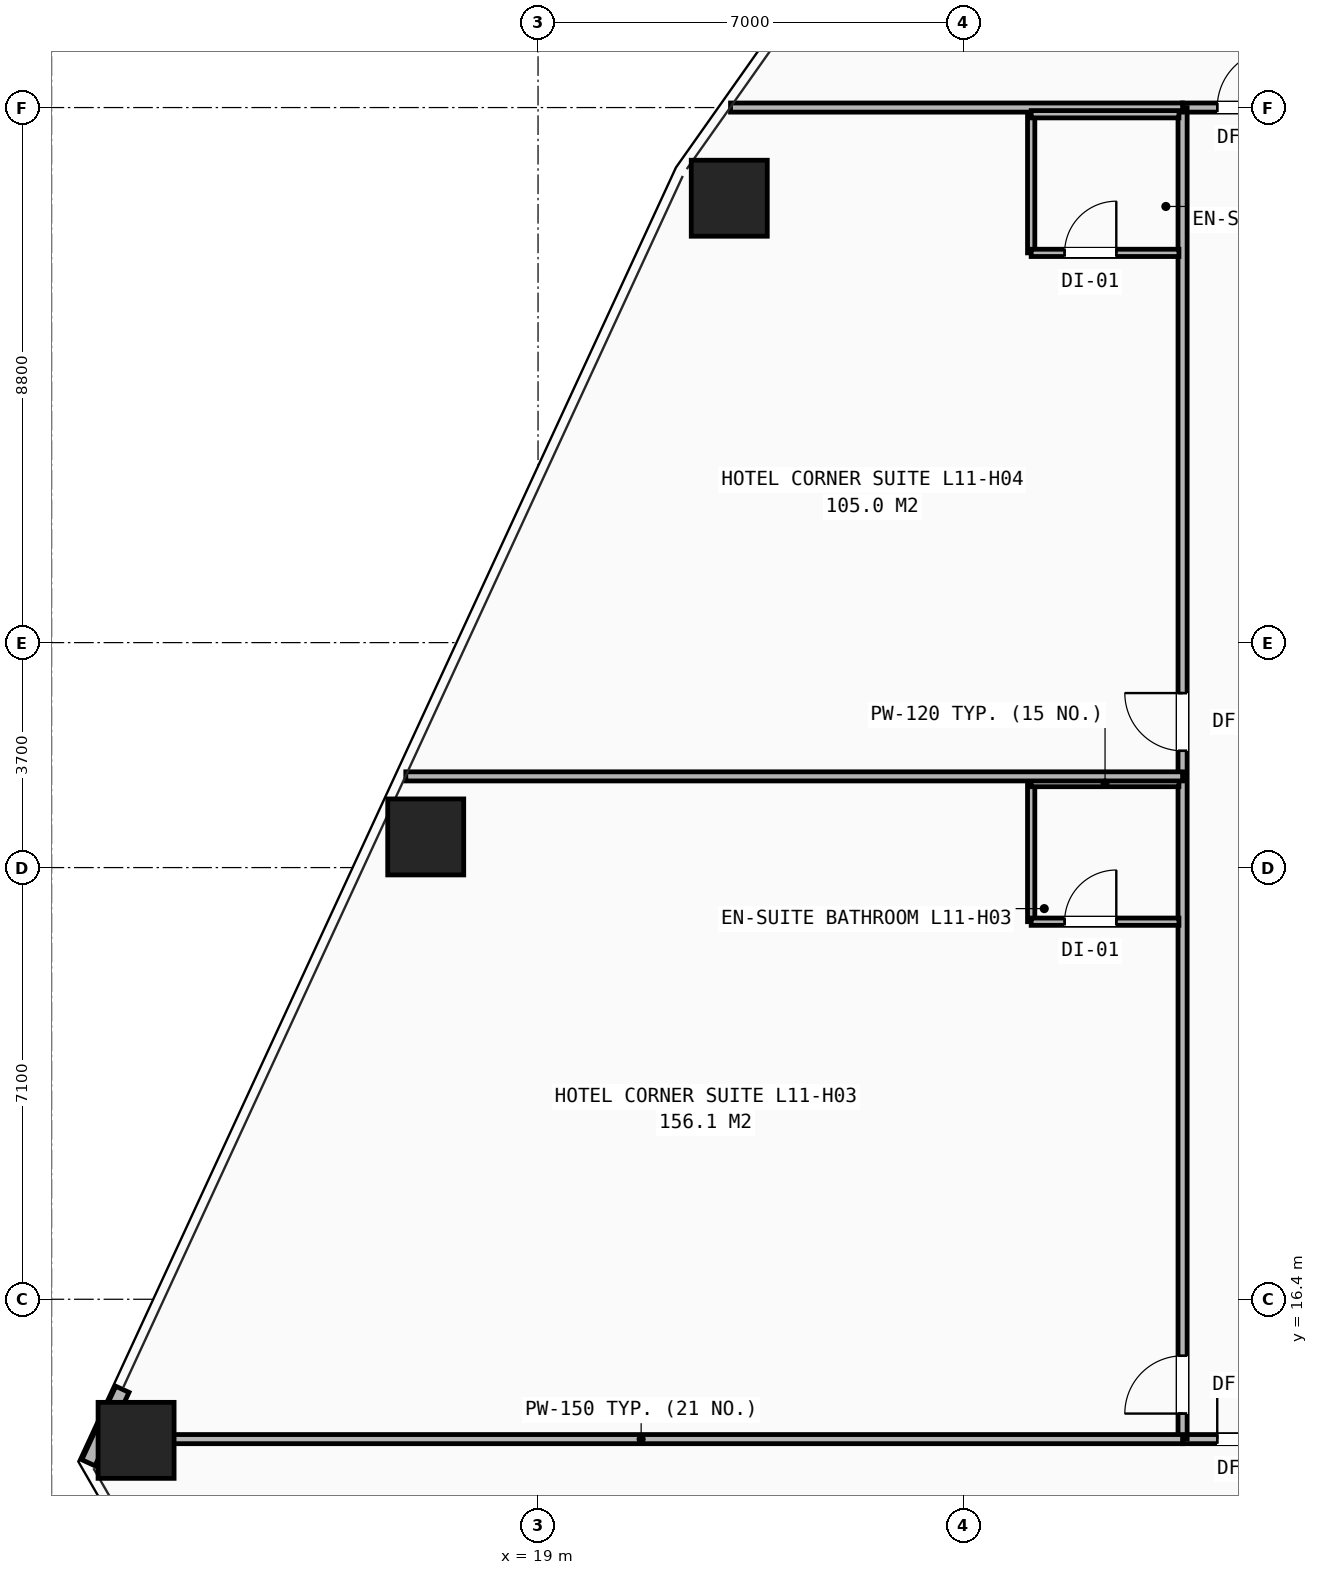
"""IFC4 building model, lengths in metres.
Left out: names, types, materials, properties, quantities, classifications, styles, units other than length and angle.
Written with IfcOpenShell. Run it as: python <this file> out.ifc"""

import sys

from ifc_helpers import new_model, si_unit, direction, frame, frame_2d, origin, origin_2d, place, context, subcontext, project, spatial, rectangle, hollow_rectangle, extrude, element, fill, save


model = new_model("IFC4")
c1 = context("Model", 3, precision=1e-05, world=origin(), true_north=direction((0.0, 1.0)))
c2 = subcontext(c1, "Body", "Model", "MODEL_VIEW")
j1 = project(units=[si_unit("LENGTHUNIT", "METRE"), si_unit("PLANEANGLEUNIT", "RADIAN")], contexts=[c1])
p1 = place(None, origin())
s1 = spatial("IfcSite", under=j1, at=p1, CompositionType="ELEMENT")
p2 = place(p1, origin())
s2 = spatial("IfcBuilding", under=s1, at=p2, CompositionType="ELEMENT")
p3 = place(p2, frame((0.0, 0.0, 43.2)))
s3 = spatial("IfcBuildingStorey", under=s2, at=p3, CompositionType="ELEMENT", Elevation=43.2)
for number, where, z_axis, x_axis in (
    (1, (22.145, 34.509, 0.0), (0.0, 0.0, 1.0), (1.0, 0.0, 0.0)),
    (2, (17.153, 24.004, 0.0), (0.0, 0.0, 1.0), (1.0, 0.0, 0.0)),
    (3, (12.389, 14.08, 0.0), (0.0, 0.0, 1.0), (1.0, 0.0, 0.0)),
):
    element("IfcColumn", number, at=place(p3, frame(where, z_axis=z_axis, x_axis=x_axis)), inside=s3, PredefinedType="COLUMN", context=c2, shape_type="SweptSolid", body=[
        extrude(hollow_rectangle(XDim=1.25, YDim=1.25, WallThickness=0.08, at=origin_2d()), origin(), (0.0, 0.0, 1.0), 3.2),
    ])
p4 = place(p3, frame((12.164, 14.919, 0.0), z_axis=(0.0, 0.0, 1.0), x_axis=(-0.419348851808, -0.907825170662, 0.0)))
e4 = element("IfcWall", 4, at=p4, inside=s3, PredefinedType="SHEAR", context=c2, shape_type="SweptSolid", body=[
    extrude(rectangle(XDim=1.332, YDim=0.24, at=frame_2d((0.666, 0.0))), origin(), (0.0, 0.0, 1.0), 2.263),
])
p5 = place(p3, frame((29.6, 14.1, 0.0), z_axis=(0.0, 0.0, 1.0), x_axis=(1.0, 0.0, 0.0)))
e5 = element("IfcWall", 5, at=p5, inside=s3, PredefinedType="PARTITIONING", context=c2, shape_type="SweptSolid", body=[
    extrude(rectangle(XDim=20.8, YDim=0.15, at=frame_2d((10.4, 0.0))), origin(), (0.0, 0.0, 1.0), 2.191),
])
p6 = place(p5, frame((0.57, 0.0, 0.0)))
e6 = element("IfcOpeningElement", 6, at=p6, cuts=e5, PredefinedType="OPENING", context=c2, shape_type="SweptSolid", body=[
    extrude(rectangle(XDim=0.95, YDim=2.1, at=frame_2d((0.475, 1.05))), frame((0.0, 0.085, 0.0), z_axis=(0.0, -1.0, 0.0), x_axis=(1.0, 0.0, 0.0)), (0.0, 0.0, 1.0), 0.17),
])
p7 = place(p5, frame((10.32, 0.0, 0.0)))
e7 = element("IfcOpeningElement", 7, at=p7, cuts=e5, PredefinedType="OPENING", context=c2, shape_type="SweptSolid", body=[
    extrude(rectangle(XDim=0.95, YDim=2.1, at=frame_2d((0.475, 1.05))), frame((0.0, 0.085, 0.0), z_axis=(0.0, -1.0, 0.0), x_axis=(1.0, 0.0, 0.0)), (0.0, 0.0, 1.0), 0.17),
])
p8 = place(p3, frame((29.6, 36.0, 0.0), z_axis=(0.0, 0.0, 1.0), x_axis=(1.0, 0.0, 0.0)))
e8 = element("IfcWall", 8, at=p8, inside=s3, PredefinedType="PARTITIONING", context=c2, shape_type="SweptSolid", body=[
    extrude(rectangle(XDim=9.65, YDim=0.15, at=frame_2d((4.825, 0.0))), origin(), (0.0, 0.0, 1.0), 2.98),
])
p9 = place(p8, frame((0.57, 0.0, 0.0)))
e9 = element("IfcOpeningElement", 9, at=p9, cuts=e8, PredefinedType="OPENING", context=c2, shape_type="SweptSolid", body=[
    extrude(rectangle(XDim=0.95, YDim=2.1, at=frame_2d((0.475, 1.05))), frame((0.0, 0.085, 0.0), z_axis=(0.0, -1.0, 0.0), x_axis=(1.0, 0.0, 0.0)), (0.0, 0.0, 1.0), 0.17),
])
p10 = place(p3, frame((29.6, 14.1, 0.0), z_axis=(0.0, 0.0, 1.0), x_axis=(0.0, 1.0, 0.0)))
e10 = element("IfcWall", 10, at=p10, inside=s3, PredefinedType="PARTITIONING", context=c2, shape_type="SweptSolid", body=[
    extrude(rectangle(XDim=21.9, YDim=0.15, at=frame_2d((10.95, 0.0))), origin(), (0.0, 0.0, 1.0), 2.191),
])
p11 = place(p10, frame((0.42, 0.0, 0.0)))
e11 = element("IfcOpeningElement", 11, at=p11, cuts=e10, PredefinedType="OPENING", context=c2, shape_type="SweptSolid", body=[
    extrude(rectangle(XDim=0.95, YDim=2.1, at=frame_2d((0.475, 1.05))), frame((0.0, 0.085, 0.0), z_axis=(0.0, -1.0, 0.0), x_axis=(1.0, 0.0, 0.0)), (0.0, 0.0, 1.0), 0.17),
])
p12 = place(p10, frame((11.32, 0.0, 0.0)))
e12 = element("IfcOpeningElement", 12, at=p12, cuts=e10, PredefinedType="OPENING", context=c2, shape_type="SweptSolid", body=[
    extrude(rectangle(XDim=0.95, YDim=2.1, at=frame_2d((0.475, 1.05))), frame((0.0, 0.085, 0.0), z_axis=(0.0, -1.0, 0.0), x_axis=(1.0, 0.0, 0.0)), (0.0, 0.0, 1.0), 0.17),
])
p13 = place(p3, frame((11.791, 14.1, 0.0), z_axis=(0.0, 0.0, 1.0), x_axis=(1.0, 0.0, 0.0)))
e13 = element("IfcWall", 13, at=p13, inside=s3, PredefinedType="PARTITIONING", context=c2, shape_type="SweptSolid", body=[
    extrude(rectangle(XDim=17.809, YDim=0.15, at=frame_2d((8.904, 0.0))), origin(), (0.0, 0.0, 1.0), 2.191),
])
p14 = place(p3, frame((22.166, 36.0, 0.0), z_axis=(0.0, 0.0, 1.0), x_axis=(1.0, 0.0, 0.0)))
e14 = element("IfcWall", 14, at=p14, inside=s3, PredefinedType="PARTITIONING", context=c2, shape_type="SweptSolid", body=[
    extrude(rectangle(XDim=7.434, YDim=0.15, at=frame_2d((3.717, 0.0))), origin(), (0.0, 0.0, 1.0), 2.268),
])
p15 = place(p3, frame((27.11, 22.61, 0.0), z_axis=(0.0, 0.0, 1.0), x_axis=(0.0, 1.0, 0.0)))
e15 = element("IfcWall", 15, at=p15, inside=s3, PredefinedType="PARTITIONING", context=c2, shape_type="SweptSolid", body=[
    extrude(rectangle(XDim=2.28, YDim=0.12, at=frame_2d((1.14, 0.0))), origin(), (0.0, 0.0, 1.0), 2.98),
])
p16 = place(p3, frame((27.11, 22.61, 0.0), z_axis=(0.0, 0.0, 1.0), x_axis=(1.0, 0.0, 0.0)))
e16 = element("IfcWall", 16, at=p16, inside=s3, PredefinedType="PARTITIONING", context=c2, shape_type="SweptSolid", body=[
    extrude(rectangle(XDim=2.43, YDim=0.12, at=frame_2d((1.215, 0.0))), origin(), (0.0, 0.0, 1.0), 2.98),
])
p17 = place(p16, frame((0.55, 0.0, 0.0)))
e17 = element("IfcOpeningElement", 17, at=p17, cuts=e16, PredefinedType="OPENING", context=c2, shape_type="SweptSolid", body=[
    extrude(rectangle(XDim=0.85, YDim=2.05, at=frame_2d((0.425, 1.025))), frame((0.0, 0.07, 0.0), z_axis=(0.0, -1.0, 0.0), x_axis=(1.0, 0.0, 0.0)), (0.0, 0.0, 1.0), 0.14),
])
p18 = place(p3, frame((27.11, 24.89, 0.0), z_axis=(0.0, 0.0, 1.0), x_axis=(1.0, 0.0, 0.0)))
e18 = element("IfcWall", 18, at=p18, inside=s3, PredefinedType="PARTITIONING", context=c2, shape_type="SweptSolid", body=[
    extrude(rectangle(XDim=2.43, YDim=0.12, at=frame_2d((1.215, 0.0))), origin(), (0.0, 0.0, 1.0), 2.98),
])
p19 = place(p3, frame((16.825, 25.0, 0.0), z_axis=(0.0, 0.0, 1.0), x_axis=(1.0, 0.0, 0.0)))
e19 = element("IfcWall", 19, at=p19, inside=s3, PredefinedType="PARTITIONING", context=c2, shape_type="SweptSolid", body=[
    extrude(rectangle(XDim=12.775, YDim=0.15, at=frame_2d((6.387, 0.0))), origin(), (0.0, 0.0, 1.0), 2.268),
])
p20 = place(p3, frame((27.11, 33.61, 0.0), z_axis=(0.0, 0.0, 1.0), x_axis=(0.0, 1.0, 0.0)))
e20 = element("IfcWall", 20, at=p20, inside=s3, PredefinedType="PARTITIONING", context=c2, shape_type="SweptSolid", body=[
    extrude(rectangle(XDim=2.28, YDim=0.12, at=frame_2d((1.14, 0.0))), origin(), (0.0, 0.0, 1.0), 2.513),
])
p21 = place(p3, frame((27.11, 33.61, 0.0), z_axis=(0.0, 0.0, 1.0), x_axis=(1.0, 0.0, 0.0)))
e21 = element("IfcWall", 21, at=p21, inside=s3, PredefinedType="PARTITIONING", context=c2, shape_type="SweptSolid", body=[
    extrude(rectangle(XDim=2.43, YDim=0.12, at=frame_2d((1.215, 0.0))), origin(), (0.0, 0.0, 1.0), 2.513),
])
p22 = place(p21, frame((0.55, 0.0, 0.0)))
e22 = element("IfcOpeningElement", 22, at=p22, cuts=e21, PredefinedType="OPENING", context=c2, shape_type="SweptSolid", body=[
    extrude(rectangle(XDim=0.85, YDim=2.05, at=frame_2d((0.425, 1.025))), frame((0.0, 0.07, 0.0), z_axis=(0.0, -1.0, 0.0), x_axis=(1.0, 0.0, 0.0)), (0.0, 0.0, 1.0), 0.14),
])
p23 = place(p3, frame((27.11, 35.89, 0.0), z_axis=(0.0, 0.0, 1.0), x_axis=(1.0, 0.0, 0.0)))
e23 = element("IfcWall", 23, at=p23, inside=s3, PredefinedType="PARTITIONING", context=c2, shape_type="SweptSolid", body=[
    extrude(rectangle(XDim=2.43, YDim=0.12, at=frame_2d((1.215, 0.0))), origin(), (0.0, 0.0, 1.0), 2.513),
])
p24 = place(p6, origin())
e24 = element("IfcDoor", 24, at=p24, inside=s3, OperationType="SINGLE_SWING_LEFT", PredefinedType="DOOR", context=c2, shape_type="SweptSolid", body=[
    extrude(rectangle(XDim=0.95, YDim=2.1, at=frame_2d((0.475, 1.05))), frame((0.0, 0.025, 0.0), z_axis=(0.0, -1.0, 0.0), x_axis=(1.0, 0.0, 0.0)), (0.0, 0.0, 1.0), 0.05),
])
fill(e6, e24)
p25 = place(p11, origin())
e25 = element("IfcDoor", 25, at=p25, inside=s3, OperationType="SINGLE_SWING_LEFT", PredefinedType="DOOR", context=c2, shape_type="SweptSolid", body=[
    extrude(rectangle(XDim=0.95, YDim=2.1, at=frame_2d((0.475, 1.05))), frame((0.0, 0.025, 0.0), z_axis=(0.0, -1.0, 0.0), x_axis=(1.0, 0.0, 0.0)), (0.0, 0.0, 1.0), 0.05),
])
fill(e11, e25)
p26 = place(p17, origin())
e26 = element("IfcDoor", 26, at=p26, inside=s3, OperationType="SINGLE_SWING_RIGHT", PredefinedType="DOOR", context=c2, shape_type="SweptSolid", body=[
    extrude(rectangle(XDim=0.85, YDim=2.05, at=frame_2d((0.425, 1.025))), frame((0.0, 0.025, 0.0), z_axis=(0.0, -1.0, 0.0), x_axis=(1.0, 0.0, 0.0)), (0.0, 0.0, 1.0), 0.05),
])
fill(e17, e26)
p27 = place(p12, origin())
e27 = element("IfcDoor", 27, at=p27, inside=s3, OperationType="SINGLE_SWING_RIGHT", PredefinedType="DOOR", context=c2, shape_type="SweptSolid", body=[
    extrude(rectangle(XDim=0.95, YDim=2.1, at=frame_2d((0.475, 1.05))), frame((0.0, 0.025, 0.0), z_axis=(0.0, -1.0, 0.0), x_axis=(1.0, 0.0, 0.0)), (0.0, 0.0, 1.0), 0.05),
])
fill(e12, e27)
p28 = place(p22, origin())
e28 = element("IfcDoor", 28, at=p28, inside=s3, OperationType="SINGLE_SWING_RIGHT", PredefinedType="DOOR", context=c2, shape_type="SweptSolid", body=[
    extrude(rectangle(XDim=0.85, YDim=2.05, at=frame_2d((0.425, 1.025))), frame((0.0, 0.025, 0.0), z_axis=(0.0, -1.0, 0.0), x_axis=(1.0, 0.0, 0.0)), (0.0, 0.0, 1.0), 0.05),
])
fill(e22, e28)
p29 = place(p9, origin())
e29 = element("IfcDoor", 29, at=p29, inside=s3, OperationType="SINGLE_SWING_RIGHT", PredefinedType="DOOR", context=c2, shape_type="SweptSolid", body=[
    extrude(rectangle(XDim=0.95, YDim=2.1, at=frame_2d((0.475, 1.05))), frame((0.0, 0.025, 0.0), z_axis=(0.0, -1.0, 0.0), x_axis=(1.0, 0.0, 0.0)), (0.0, 0.0, 1.0), 0.05),
])
fill(e9, e29)
save(model, sys.argv[1])
